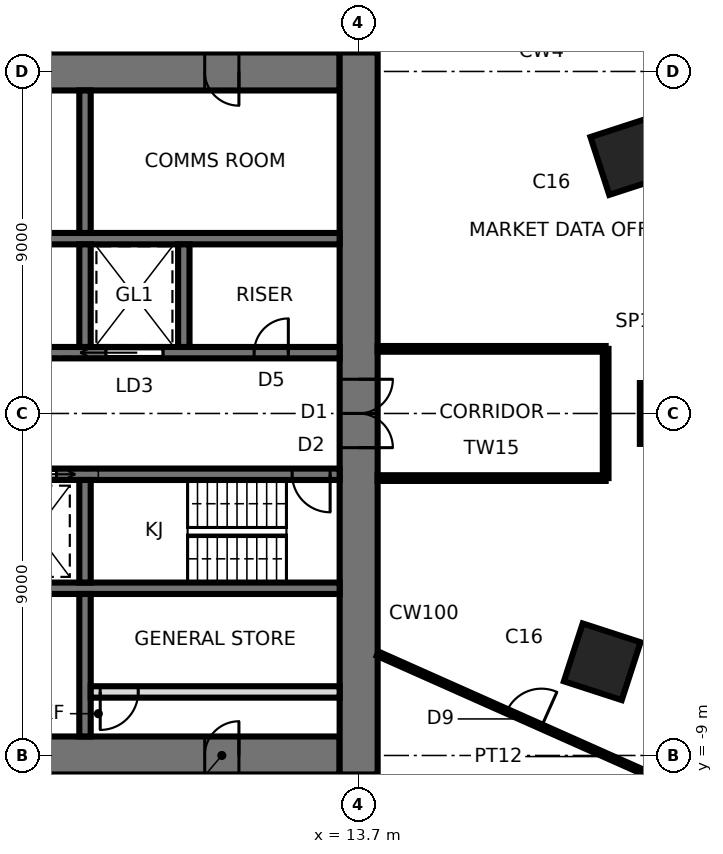
"""IFC4 building model, lengths in metres.
Left out: names, types, materials, properties, quantities, classifications, styles, units other than length and angle.
Written with IfcOpenShell. Run it as: python <this file> out.ifc"""

import sys

from ifc_helpers import new_model, si_unit, direction, frame, frame_2d, origin, origin_2d, place, context, subcontext, project, spatial, rectangle, extrude, element, fill, save


model = new_model("IFC4")
c1 = context("Model", 3, precision=1e-05, world=origin(), true_north=direction((0.0, 1.0)))
c2 = subcontext(c1, "Body", "Model", "MODEL_VIEW")
j1 = project(units=[si_unit("LENGTHUNIT", "METRE"), si_unit("PLANEANGLEUNIT", "RADIAN")], contexts=[c1])
p1 = place(None, origin())
s1 = spatial("IfcSite", under=j1, at=p1, CompositionType="ELEMENT")
p2 = place(p1, origin())
s2 = spatial("IfcBuilding", under=s1, at=p2, CompositionType="ELEMENT")
p3 = place(p2, frame((0.0, 0.0, 154.8)))
s3 = spatial("IfcBuildingStorey", under=s2, at=p3, CompositionType="ELEMENT", Elevation=154.8)
for number, where, z_axis, x_axis in (
    (1, (21.9, 0.0, 0.0), (0.0, 0.0, 1.0), (1.0, 0.0, 0.0)),
    (2, (20.808, 6.761, 0.0), (0.0, 0.0, 1.0), (0.951, 0.309, 0.0)),
    (3, (20.109, -6.534, 0.0), (0.0, 0.0, 1.0), (0.951, -0.309, 0.0)),
):
    element("IfcColumn", number, at=place(p3, frame(where, z_axis=z_axis, x_axis=x_axis)), inside=s3, PredefinedType="COLUMN", context=c2, shape_type="SweptSolid", body=[
        extrude(rectangle(XDim=1.6, YDim=1.6, at=origin_2d()), origin(), (0.0, 0.0, 1.0), 3.9),
    ])
p4 = place(p3, frame((-13.2, -9.0, 0.0), z_axis=(0.0, 0.0, 1.0), x_axis=(1.0, 0.0, 0.0)))
e4 = element("IfcWall", 4, at=p4, inside=s3, PredefinedType="SHEAR", context=c2, shape_type="SweptSolid", body=[
    extrude(rectangle(XDim=26.4, YDim=1.0, at=frame_2d((13.2, 0.0))), origin(), (0.0, 0.0, 1.0), 3.9),
])
p5 = place(p4, frame((2.65, 0.0, 0.0)))
e5 = element("IfcOpeningElement", 5, at=p5, cuts=e4, PredefinedType="OPENING", context=c2, shape_type="SweptSolid", body=[
    extrude(rectangle(XDim=0.9, YDim=2.1, at=frame_2d((0.45, 1.05))), frame((0.0, 0.51, 0.0), z_axis=(0.0, -1.0, 0.0), x_axis=(1.0, 0.0, 0.0)), (0.0, 0.0, 1.0), 1.02),
])
p6 = place(p4, frame((9.5, 0.0, 0.0)))
e6 = element("IfcOpeningElement", 6, at=p6, cuts=e4, PredefinedType="OPENING", context=c2, shape_type="SweptSolid", body=[
    extrude(rectangle(XDim=0.9, YDim=2.1, at=frame_2d((0.45, 1.05))), frame((0.0, 0.51, 0.0), z_axis=(0.0, -1.0, 0.0), x_axis=(1.0, 0.0, 0.0)), (0.0, 0.0, 1.0), 1.02),
])
p7 = place(p4, frame((16.0, 0.0, 0.0)))
e7 = element("IfcOpeningElement", 7, at=p7, cuts=e4, PredefinedType="OPENING", context=c2, shape_type="SweptSolid", body=[
    extrude(rectangle(XDim=0.9, YDim=2.1, at=frame_2d((0.45, 1.05))), frame((0.0, 0.51, 0.0), z_axis=(0.0, -1.0, 0.0), x_axis=(1.0, 0.0, 0.0)), (0.0, 0.0, 1.0), 1.02),
])
p8 = place(p4, frame((22.85, 0.0, 0.0)))
e8 = element("IfcOpeningElement", 8, at=p8, cuts=e4, PredefinedType="OPENING", context=c2, shape_type="SweptSolid", body=[
    extrude(rectangle(XDim=0.9, YDim=2.1, at=frame_2d((0.45, 1.05))), frame((0.0, 0.51, 0.0), z_axis=(0.0, -1.0, 0.0), x_axis=(1.0, 0.0, 0.0)), (0.0, 0.0, 1.0), 1.02),
])
p9 = place(p3, frame((13.2, 9.0, 0.0), z_axis=(0.0, 0.0, 1.0), x_axis=(-1.0, 0.0, 0.0)))
e9 = element("IfcWall", 9, at=p9, inside=s3, PredefinedType="SHEAR", context=c2, shape_type="SweptSolid", body=[
    extrude(rectangle(XDim=26.4, YDim=1.0, at=frame_2d((13.2, 0.0))), origin(), (0.0, 0.0, 1.0), 3.9),
])
p10 = place(p9, frame((2.65, 0.0, 0.0)))
e10 = element("IfcOpeningElement", 10, at=p10, cuts=e9, PredefinedType="OPENING", context=c2, shape_type="SweptSolid", body=[
    extrude(rectangle(XDim=0.9, YDim=2.1, at=frame_2d((0.45, 1.05))), frame((0.0, 0.51, 0.0), z_axis=(0.0, -1.0, 0.0), x_axis=(1.0, 0.0, 0.0)), (0.0, 0.0, 1.0), 1.02),
])
p11 = place(p9, frame((9.5, 0.0, 0.0)))
e11 = element("IfcOpeningElement", 11, at=p11, cuts=e9, PredefinedType="OPENING", context=c2, shape_type="SweptSolid", body=[
    extrude(rectangle(XDim=0.9, YDim=2.1, at=frame_2d((0.45, 1.05))), frame((0.0, 0.51, 0.0), z_axis=(0.0, -1.0, 0.0), x_axis=(1.0, 0.0, 0.0)), (0.0, 0.0, 1.0), 1.02),
])
p12 = place(p9, frame((16.0, 0.0, 0.0)))
e12 = element("IfcOpeningElement", 12, at=p12, cuts=e9, PredefinedType="OPENING", context=c2, shape_type="SweptSolid", body=[
    extrude(rectangle(XDim=0.9, YDim=2.1, at=frame_2d((0.45, 1.05))), frame((0.0, 0.51, 0.0), z_axis=(0.0, -1.0, 0.0), x_axis=(1.0, 0.0, 0.0)), (0.0, 0.0, 1.0), 1.02),
])
p13 = place(p9, frame((21.25, 0.0, 0.0)))
e13 = element("IfcOpeningElement", 13, at=p13, cuts=e9, PredefinedType="OPENING", context=c2, shape_type="SweptSolid", body=[
    extrude(rectangle(XDim=0.9, YDim=2.1, at=frame_2d((0.45, 1.05))), frame((0.0, 0.51, 0.0), z_axis=(0.0, -1.0, 0.0), x_axis=(1.0, 0.0, 0.0)), (0.0, 0.0, 1.0), 1.02),
])
p14 = place(p9, frame((24.8, 0.0, 0.0)))
e14 = element("IfcOpeningElement", 14, at=p14, cuts=e9, PredefinedType="OPENING", context=c2, shape_type="SweptSolid", body=[
    extrude(rectangle(XDim=1.0, YDim=2.1, at=frame_2d((0.5, 1.05))), frame((0.0, 0.51, 0.0), z_axis=(0.0, -1.0, 0.0), x_axis=(1.0, 0.0, 0.0)), (0.0, 0.0, 1.0), 1.02),
])
p15 = place(p3, frame((13.7, -9.5, 0.0), z_axis=(0.0, 0.0, 1.0), x_axis=(0.0, 1.0, 0.0)))
e15 = element("IfcWall", 15, at=p15, inside=s3, PredefinedType="SHEAR", context=c2, shape_type="SweptSolid", body=[
    extrude(rectangle(XDim=19.0, YDim=1.0, at=frame_2d((9.5, 0.0))), origin(), (0.0, 0.0, 1.0), 3.9),
])
p16 = place(p15, frame((8.6, 0.0, 0.0)))
e16 = element("IfcOpeningElement", 16, at=p16, cuts=e15, PredefinedType="OPENING", context=c2, shape_type="SweptSolid", body=[
    extrude(rectangle(XDim=1.8, YDim=2.4, at=frame_2d((0.9, 1.2))), frame((0.0, 0.51, 0.0), z_axis=(0.0, -1.0, 0.0), x_axis=(1.0, 0.0, 0.0)), (0.0, 0.0, 1.0), 1.02),
])
p17 = place(p3, frame((-13.2, 1.6, 0.0), z_axis=(0.0, 0.0, 1.0), x_axis=(1.0, 0.0, 0.0)))
e17 = element("IfcWall", 17, at=p17, inside=s3, PredefinedType="SHEAR", context=c2, shape_type="SweptSolid", body=[
    extrude(rectangle(XDim=26.4, YDim=0.3, at=frame_2d((13.2, 0.0))), origin(), (0.0, 0.0, 1.0), 3.9),
])
p18 = place(p17, frame((0.25, 0.0, 0.0)))
e18 = element("IfcOpeningElement", 18, at=p18, cuts=e17, PredefinedType="OPENING", context=c2, shape_type="SweptSolid", body=[
    extrude(rectangle(XDim=1.0, YDim=2.1, at=frame_2d((0.5, 1.05))), frame((0.0, 0.16, 0.0), z_axis=(0.0, -1.0, 0.0), x_axis=(1.0, 0.0, 0.0)), (0.0, 0.0, 1.0), 0.32),
])
p19 = place(p17, frame((20.25, 0.0, 0.0)))
e19 = element("IfcOpeningElement", 19, at=p19, cuts=e17, PredefinedType="OPENING", context=c2, shape_type="SweptSolid", body=[
    extrude(rectangle(XDim=1.5, YDim=2.4, at=frame_2d((0.75, 1.2))), frame((0.0, 0.16, 0.0), z_axis=(0.0, -1.0, 0.0), x_axis=(1.0, 0.0, 0.0)), (0.0, 0.0, 1.0), 0.32),
])
p20 = place(p17, frame((7.55, 0.0, 0.0)))
e20 = element("IfcOpeningElement", 20, at=p20, cuts=e17, PredefinedType="OPENING", context=c2, shape_type="SweptSolid", body=[
    extrude(rectangle(XDim=0.9, YDim=2.1, at=frame_2d((0.45, 1.05))), frame((0.0, 0.16, 0.0), z_axis=(0.0, -1.0, 0.0), x_axis=(1.0, 0.0, 0.0)), (0.0, 0.0, 1.0), 0.32),
])
p21 = place(p17, frame((10.15, 0.0, 0.0)))
e21 = element("IfcOpeningElement", 21, at=p21, cuts=e17, PredefinedType="OPENING", context=c2, shape_type="SweptSolid", body=[
    extrude(rectangle(XDim=0.9, YDim=2.1, at=frame_2d((0.45, 1.05))), frame((0.0, 0.16, 0.0), z_axis=(0.0, -1.0, 0.0), x_axis=(1.0, 0.0, 0.0)), (0.0, 0.0, 1.0), 0.32),
])
p22 = place(p17, frame((12.75, 0.0, 0.0)))
e22 = element("IfcOpeningElement", 22, at=p22, cuts=e17, PredefinedType="OPENING", context=c2, shape_type="SweptSolid", body=[
    extrude(rectangle(XDim=0.9, YDim=2.1, at=frame_2d((0.45, 1.05))), frame((0.0, 0.16, 0.0), z_axis=(0.0, -1.0, 0.0), x_axis=(1.0, 0.0, 0.0)), (0.0, 0.0, 1.0), 0.32),
])
p23 = place(p17, frame((24.15, 0.0, 0.0)))
e23 = element("IfcOpeningElement", 23, at=p23, cuts=e17, PredefinedType="OPENING", context=c2, shape_type="SweptSolid", body=[
    extrude(rectangle(XDim=0.9, YDim=2.1, at=frame_2d((0.45, 1.05))), frame((0.0, 0.16, 0.0), z_axis=(0.0, -1.0, 0.0), x_axis=(1.0, 0.0, 0.0)), (0.0, 0.0, 1.0), 0.32),
])
p24 = place(p3, frame((-13.2, -1.6, 0.0), z_axis=(0.0, 0.0, 1.0), x_axis=(1.0, 0.0, 0.0)))
e24 = element("IfcWall", 24, at=p24, inside=s3, PredefinedType="SHEAR", context=c2, shape_type="SweptSolid", body=[
    extrude(rectangle(XDim=26.4, YDim=0.3, at=frame_2d((13.2, 0.0))), origin(), (0.0, 0.0, 1.0), 3.9),
])
p25 = place(p24, frame((25.15, 0.0, 0.0)))
e25 = element("IfcOpeningElement", 25, at=p25, cuts=e24, PredefinedType="OPENING", context=c2, shape_type="SweptSolid", body=[
    extrude(rectangle(XDim=1.0, YDim=2.1, at=frame_2d((0.5, 1.05))), frame((0.0, 0.16, 0.0), z_axis=(0.0, -1.0, 0.0), x_axis=(1.0, 0.0, 0.0)), (0.0, 0.0, 1.0), 0.32),
])
p26 = place(p24, frame((7.45, 0.0, 0.0)))
e26 = element("IfcOpeningElement", 26, at=p26, cuts=e24, PredefinedType="OPENING", context=c2, shape_type="SweptSolid", body=[
    extrude(rectangle(XDim=1.1, YDim=2.3, at=frame_2d((0.55, 1.15))), frame((0.0, 0.16, 0.0), z_axis=(0.0, -1.0, 0.0), x_axis=(1.0, 0.0, 0.0)), (0.0, 0.0, 1.0), 0.32),
])
p27 = place(p24, frame((10.05, 0.0, 0.0)))
e27 = element("IfcOpeningElement", 27, at=p27, cuts=e24, PredefinedType="OPENING", context=c2, shape_type="SweptSolid", body=[
    extrude(rectangle(XDim=1.1, YDim=2.3, at=frame_2d((0.55, 1.15))), frame((0.0, 0.16, 0.0), z_axis=(0.0, -1.0, 0.0), x_axis=(1.0, 0.0, 0.0)), (0.0, 0.0, 1.0), 0.32),
])
p28 = place(p24, frame((12.65, 0.0, 0.0)))
e28 = element("IfcOpeningElement", 28, at=p28, cuts=e24, PredefinedType="OPENING", context=c2, shape_type="SweptSolid", body=[
    extrude(rectangle(XDim=1.1, YDim=2.3, at=frame_2d((0.55, 1.15))), frame((0.0, 0.16, 0.0), z_axis=(0.0, -1.0, 0.0), x_axis=(1.0, 0.0, 0.0)), (0.0, 0.0, 1.0), 0.32),
])
p29 = place(p24, frame((15.25, 0.0, 0.0)))
e29 = element("IfcOpeningElement", 29, at=p29, cuts=e24, PredefinedType="OPENING", context=c2, shape_type="SweptSolid", body=[
    extrude(rectangle(XDim=1.1, YDim=2.3, at=frame_2d((0.55, 1.15))), frame((0.0, 0.16, 0.0), z_axis=(0.0, -1.0, 0.0), x_axis=(1.0, 0.0, 0.0)), (0.0, 0.0, 1.0), 0.32),
])
p30 = place(p24, frame((17.85, 0.0, 0.0)))
e30 = element("IfcOpeningElement", 30, at=p30, cuts=e24, PredefinedType="OPENING", context=c2, shape_type="SweptSolid", body=[
    extrude(rectangle(XDim=1.1, YDim=2.3, at=frame_2d((0.55, 1.15))), frame((0.0, 0.16, 0.0), z_axis=(0.0, -1.0, 0.0), x_axis=(1.0, 0.0, 0.0)), (0.0, 0.0, 1.0), 0.32),
])
p31 = place(p24, frame((5.55, 0.0, 0.0)))
e31 = element("IfcOpeningElement", 31, at=p31, cuts=e24, PredefinedType="OPENING", context=c2, shape_type="SweptSolid", body=[
    extrude(rectangle(XDim=0.9, YDim=2.1, at=frame_2d((0.45, 1.05))), frame((0.0, 0.16, 0.0), z_axis=(0.0, -1.0, 0.0), x_axis=(1.0, 0.0, 0.0)), (0.0, 0.0, 1.0), 0.32),
])
for number, where, z_axis, x_axis in (
    (32, (-13.2, 4.6, 0.0), (0.0, 0.0, 1.0), (1.0, 0.0, 0.0)),
    (33, (-13.2, -4.6, 0.0), (0.0, 0.0, 1.0), (1.0, 0.0, 0.0)),
):
    element("IfcWall", number, at=place(p3, frame(where, z_axis=z_axis, x_axis=x_axis)), inside=s3, PredefinedType="SHEAR", context=c2, shape_type="SweptSolid", body=[
        extrude(rectangle(XDim=26.4, YDim=0.3, at=frame_2d((13.2, 0.0))), origin(), (0.0, 0.0, 1.0), 3.9),
    ])
p32 = place(p3, frame((6.5, 1.75, 0.0), z_axis=(0.0, 0.0, 1.0), x_axis=(0.0, 1.0, 0.0)))
e34 = element("IfcWall", 34, at=p32, inside=s3, PredefinedType="SHEAR", context=c2, shape_type="SweptSolid", body=[
    extrude(rectangle(XDim=2.7, YDim=0.3, at=frame_2d((1.35, 0.0))), origin(), (0.0, 0.0, 1.0), 3.9),
])
p33 = place(p3, frame((6.5, 4.75, 0.0), z_axis=(0.0, 0.0, 1.0), x_axis=(0.0, 1.0, 0.0)))
e35 = element("IfcWall", 35, at=p33, inside=s3, PredefinedType="SHEAR", context=c2, shape_type="SweptSolid", body=[
    extrude(rectangle(XDim=3.75, YDim=0.3, at=frame_2d((1.875, 0.0))), origin(), (0.0, 0.0, 1.0), 3.9),
])
p34 = place(p3, frame((6.5, -1.75, 0.0), z_axis=(0.0, 0.0, 1.0), x_axis=(0.0, -1.0, 0.0)))
e36 = element("IfcWall", 36, at=p34, inside=s3, PredefinedType="SHEAR", context=c2, shape_type="SweptSolid", body=[
    extrude(rectangle(XDim=2.7, YDim=0.3, at=frame_2d((1.35, 0.0))), origin(), (0.0, 0.0, 1.0), 3.9),
])
p35 = place(p3, frame((6.5, -4.75, 0.0), z_axis=(0.0, 0.0, 1.0), x_axis=(0.0, -1.0, 0.0)))
e37 = element("IfcWall", 37, at=p35, inside=s3, PredefinedType="SHEAR", context=c2, shape_type="SweptSolid", body=[
    extrude(rectangle(XDim=3.75, YDim=0.3, at=frame_2d((1.875, 0.0))), origin(), (0.0, 0.0, 1.0), 3.9),
])
p36 = place(p3, frame((9.1, 1.75, 0.0), z_axis=(0.0, 0.0, 1.0), x_axis=(0.0, 1.0, 0.0)))
e38 = element("IfcWall", 38, at=p36, inside=s3, PredefinedType="SHEAR", context=c2, shape_type="SweptSolid", body=[
    extrude(rectangle(XDim=2.7, YDim=0.3, at=frame_2d((1.35, 0.0))), origin(), (0.0, 0.0, 1.0), 3.9),
])
p37 = place(p3, frame((6.65, -7.328, 0.0), z_axis=(0.0, 0.0, 1.0), x_axis=(1.0, 0.0, 0.0)))
e39 = element("IfcWall", 39, at=p37, inside=s3, PredefinedType="PARTITIONING", context=c2, shape_type="SweptSolid", body=[
    extrude(rectangle(XDim=6.55, YDim=0.3, at=frame_2d((3.275, 0.0))), origin(), (0.0, 0.0, 1.0), 3.74),
])
p38 = place(p37, frame((0.25, 0.0, 0.0)))
e40 = element("IfcOpeningElement", 40, at=p38, cuts=e39, PredefinedType="OPENING", context=c2, shape_type="SweptSolid", body=[
    extrude(rectangle(XDim=1.0, YDim=2.4, at=frame_2d((0.5, 1.2))), frame((0.0, 0.16, 0.0), z_axis=(0.0, -1.0, 0.0), x_axis=(1.0, 0.0, 0.0)), (0.0, 0.0, 1.0), 0.32),
])
p39 = place(p3, frame((14.2, -6.322, 0.0), z_axis=(0.0, 0.0, 1.0), x_axis=(0.913546486883, -0.406734331357, 0.0)))
e41 = element("IfcWall", 41, at=p39, inside=s3, PredefinedType="PARTITIONING", context=c2, shape_type="SweptSolid", body=[
    extrude(rectangle(XDim=8.438, YDim=0.12, at=frame_2d((4.219, 0.0))), origin(), (0.0, 0.0, 1.0), 3.74),
])
p40 = place(p39, frame((3.719, 0.0, 0.0)))
e42 = element("IfcOpeningElement", 42, at=p40, cuts=e41, PredefinedType="OPENING", context=c2, shape_type="SweptSolid", body=[
    extrude(rectangle(XDim=1.0, YDim=2.4, at=frame_2d((0.5, 1.2))), frame((0.0, 0.07, 0.0), z_axis=(0.0, -1.0, 0.0), x_axis=(1.0, 0.0, 0.0)), (0.0, 0.0, 1.0), 0.14),
])
p41 = place(p3, frame((14.2, -1.7, 0.0), z_axis=(0.0, 0.0, 1.0), x_axis=(1.0, 0.0, 0.0)))
e43 = element("IfcWall", 43, at=p41, inside=s3, PredefinedType="PARTITIONING", context=c2, shape_type="SweptSolid", body=[
    extrude(rectangle(XDim=6.0, YDim=0.15, at=frame_2d((3.0, 0.0))), origin(), (0.0, 0.0, 1.0), 3.74),
])
p42 = place(p3, frame((20.2, -1.7, 0.0), z_axis=(0.0, 0.0, 1.0), x_axis=(0.0, 1.0, 0.0)))
e44 = element("IfcWall", 44, at=p42, inside=s3, PredefinedType="PARTITIONING", context=c2, shape_type="SweptSolid", body=[
    extrude(rectangle(XDim=3.4, YDim=0.15, at=frame_2d((1.7, 0.0))), origin(), (0.0, 0.0, 1.0), 3.74),
])
p43 = place(p3, frame((20.2, 1.7, 0.0), z_axis=(0.0, 0.0, 1.0), x_axis=(-1.0, 0.0, 0.0)))
e45 = element("IfcWall", 45, at=p43, inside=s3, PredefinedType="PARTITIONING", context=c2, shape_type="SweptSolid", body=[
    extrude(rectangle(XDim=6.0, YDim=0.15, at=frame_2d((3.0, 0.0))), origin(), (0.0, 0.0, 1.0), 3.74),
])
p44 = place(p16, frame((1.8, 0.0, 0.0), z_axis=(0.0, 0.0, 1.0), x_axis=(-1.0, 0.0, 0.0)))
e46 = element("IfcDoor", 46, at=p44, inside=s3, OperationType="DOUBLE_DOOR_SINGLE_SWING", PredefinedType="DOOR", context=c2, shape_type="SweptSolid", body=[
    extrude(rectangle(XDim=1.72, YDim=2.36, at=frame_2d((0.9, 1.18))), frame((0.0, 0.025, 0.0), z_axis=(0.0, -1.0, 0.0), x_axis=(1.0, 0.0, 0.0)), (0.0, 0.0, 1.0), 0.05),
    extrude(rectangle(XDim=0.04, YDim=2.4, at=frame_2d((1.78, 1.2))), frame((0.0, 0.25, 0.0), z_axis=(0.0, -1.0, 0.0), x_axis=(1.0, 0.0, 0.0)), (0.0, 0.0, 1.0), 0.5),
    extrude(rectangle(XDim=0.04, YDim=2.4, at=frame_2d((0.02, 1.2))), frame((0.0, 0.25, 0.0), z_axis=(0.0, -1.0, 0.0), x_axis=(1.0, 0.0, 0.0)), (0.0, 0.0, 1.0), 0.5),
    extrude(rectangle(XDim=1.72, YDim=0.04, at=frame_2d((0.9, 2.38))), frame((0.0, 0.25, 0.0), z_axis=(0.0, -1.0, 0.0), x_axis=(1.0, 0.0, 0.0)), (0.0, 0.0, 1.0), 0.5),
])
fill(e16, e46)
p45 = place(p25, frame((1.0, 0.0, 0.0), z_axis=(0.0, 0.0, 1.0), x_axis=(-1.0, 0.0, 0.0)))
e47 = element("IfcDoor", 47, at=p45, inside=s3, OperationType="SINGLE_SWING_LEFT", PredefinedType="DOOR", context=c2, shape_type="SweptSolid", body=[
    extrude(rectangle(XDim=1.0, YDim=2.1, at=frame_2d((0.5, 1.05))), frame((0.0, 0.025, 0.0), z_axis=(0.0, -1.0, 0.0), x_axis=(1.0, 0.0, 0.0)), (0.0, 0.0, 1.0), 0.05),
])
fill(e25, e47)
p46 = place(p19, origin())
e48 = element("IfcDoor", 48, at=p46, inside=s3, OperationType="SLIDING_TO_LEFT", PredefinedType="DOOR", context=c2, shape_type="SweptSolid", body=[
    extrude(rectangle(XDim=1.5, YDim=2.4, at=frame_2d((0.75, 1.2))), frame((0.0, 0.025, 0.0), z_axis=(0.0, -1.0, 0.0), x_axis=(1.0, 0.0, 0.0)), (0.0, 0.0, 1.0), 0.05),
])
fill(e19, e48)
p47 = place(p30, frame((1.1, 0.0, 0.0), z_axis=(0.0, 0.0, 1.0), x_axis=(-1.0, 0.0, 0.0)))
e49 = element("IfcDoor", 49, at=p47, inside=s3, OperationType="SLIDING_TO_LEFT", PredefinedType="DOOR", context=c2, shape_type="SweptSolid", body=[
    extrude(rectangle(XDim=1.1, YDim=2.3, at=frame_2d((0.55, 1.15))), frame((0.0, 0.025, 0.0), z_axis=(0.0, -1.0, 0.0), x_axis=(1.0, 0.0, 0.0)), (0.0, 0.0, 1.0), 0.05),
])
fill(e30, e49)
p48 = place(p23, origin())
e50 = element("IfcDoor", 50, at=p48, inside=s3, OperationType="SINGLE_SWING_RIGHT", PredefinedType="DOOR", context=c2, shape_type="SweptSolid", body=[
    extrude(rectangle(XDim=0.9, YDim=2.1, at=frame_2d((0.45, 1.05))), frame((0.0, 0.025, 0.0), z_axis=(0.0, -1.0, 0.0), x_axis=(1.0, 0.0, 0.0)), (0.0, 0.0, 1.0), 0.05),
])
fill(e23, e50)
p49 = place(p10, origin())
e51 = element("IfcDoor", 51, at=p49, inside=s3, OperationType="SINGLE_SWING_LEFT", PredefinedType="DOOR", context=c2, shape_type="SweptSolid", body=[
    extrude(rectangle(XDim=0.82, YDim=2.06, at=frame_2d((0.45, 1.03))), frame((0.0, 0.025, 0.0), z_axis=(0.0, -1.0, 0.0), x_axis=(1.0, 0.0, 0.0)), (0.0, 0.0, 1.0), 0.05),
    extrude(rectangle(XDim=0.04, YDim=2.1, at=frame_2d((0.02, 1.05))), frame((0.0, 0.25, 0.0), z_axis=(0.0, -1.0, 0.0), x_axis=(1.0, 0.0, 0.0)), (0.0, 0.0, 1.0), 0.5),
    extrude(rectangle(XDim=0.04, YDim=2.1, at=frame_2d((0.88, 1.05))), frame((0.0, 0.25, 0.0), z_axis=(0.0, -1.0, 0.0), x_axis=(1.0, 0.0, 0.0)), (0.0, 0.0, 1.0), 0.5),
    extrude(rectangle(XDim=0.82, YDim=0.04, at=frame_2d((0.45, 2.08))), frame((0.0, 0.25, 0.0), z_axis=(0.0, -1.0, 0.0), x_axis=(1.0, 0.0, 0.0)), (0.0, 0.0, 1.0), 0.5),
])
fill(e10, e51)
p50 = place(p8, origin())
e52 = element("IfcDoor", 52, at=p50, inside=s3, OperationType="SINGLE_SWING_RIGHT", PredefinedType="DOOR", context=c2, shape_type="SweptSolid", body=[
    extrude(rectangle(XDim=0.82, YDim=2.06, at=frame_2d((0.45, 1.03))), frame((0.0, 0.025, 0.0), z_axis=(0.0, -1.0, 0.0), x_axis=(1.0, 0.0, 0.0)), (0.0, 0.0, 1.0), 0.05),
    extrude(rectangle(XDim=0.04, YDim=2.1, at=frame_2d((0.02, 1.05))), frame((0.0, 0.25, 0.0), z_axis=(0.0, -1.0, 0.0), x_axis=(1.0, 0.0, 0.0)), (0.0, 0.0, 1.0), 0.5),
    extrude(rectangle(XDim=0.04, YDim=2.1, at=frame_2d((0.88, 1.05))), frame((0.0, 0.25, 0.0), z_axis=(0.0, -1.0, 0.0), x_axis=(1.0, 0.0, 0.0)), (0.0, 0.0, 1.0), 0.5),
    extrude(rectangle(XDim=0.82, YDim=0.04, at=frame_2d((0.45, 2.08))), frame((0.0, 0.25, 0.0), z_axis=(0.0, -1.0, 0.0), x_axis=(1.0, 0.0, 0.0)), (0.0, 0.0, 1.0), 0.5),
])
fill(e8, e52)
p51 = place(p38, frame((1.0, 0.0, 0.0), z_axis=(0.0, 0.0, 1.0), x_axis=(-1.0, 0.0, 0.0)))
e53 = element("IfcDoor", 53, at=p51, inside=s3, OperationType="SINGLE_SWING_RIGHT", PredefinedType="DOOR", context=c2, shape_type="SweptSolid", body=[
    extrude(rectangle(XDim=1.0, YDim=2.4, at=frame_2d((0.5, 1.2))), frame((0.0, 0.025, 0.0), z_axis=(0.0, -1.0, 0.0), x_axis=(1.0, 0.0, 0.0)), (0.0, 0.0, 1.0), 0.05),
])
fill(e40, e53)
p52 = place(p40, origin())
e54 = element("IfcDoor", 54, at=p52, inside=s3, OperationType="SINGLE_SWING_RIGHT", PredefinedType="DOOR", context=c2, shape_type="SweptSolid", body=[
    extrude(rectangle(XDim=1.0, YDim=2.4, at=frame_2d((0.5, 1.2))), frame((0.0, 0.025, 0.0), z_axis=(0.0, -1.0, 0.0), x_axis=(1.0, 0.0, 0.0)), (0.0, 0.0, 1.0), 0.05),
])
fill(e42, e54)
save(model, sys.argv[1])
